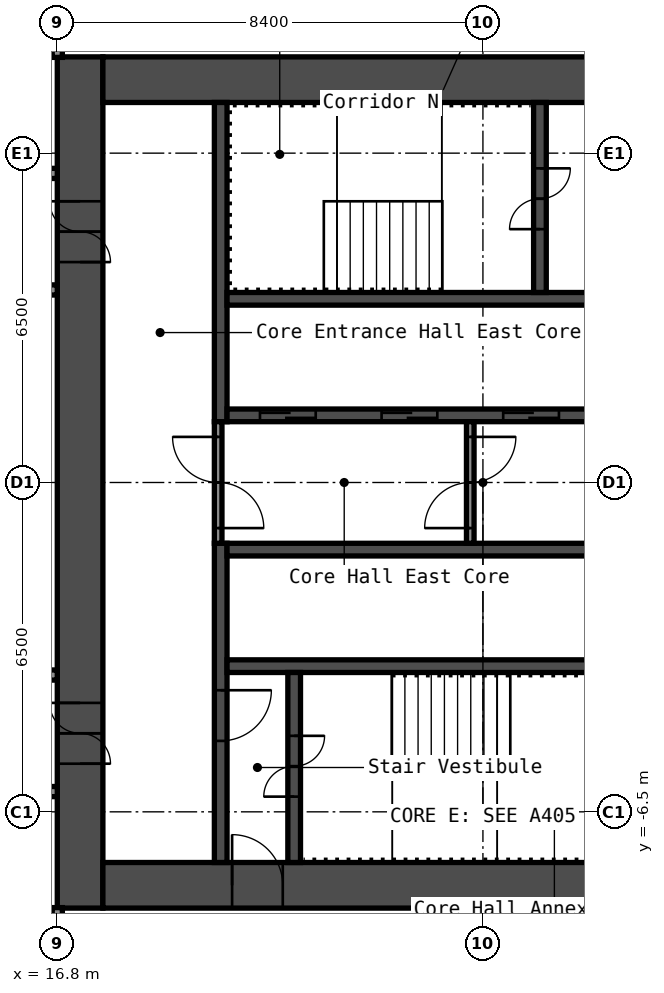
"""IFC4 building model, lengths in metres.
Left out: names, types, materials, properties, quantities, classifications, styles, units other than length and angle.
Written with IfcOpenShell. Run it as: python <this file> out.ifc"""

import sys

from ifc_helpers import new_model, si_unit, direction, frame, frame_2d, origin, place, context, subcontext, project, spatial, rectangle, extrude, element, fill, save


model = new_model("IFC4")
c1 = context("Model", 3, precision=1e-05, world=origin(), true_north=direction((0.0, 1.0)))
c2 = subcontext(c1, "Body", "Model", "MODEL_VIEW")
j1 = project(units=[si_unit("LENGTHUNIT", "METRE"), si_unit("PLANEANGLEUNIT", "RADIAN")], contexts=[c1])
p1 = place(None, origin())
s1 = spatial("IfcSite", under=j1, at=p1, CompositionType="ELEMENT")
p2 = place(p1, origin())
s2 = spatial("IfcBuilding", under=s1, at=p2, CompositionType="ELEMENT")
p3 = place(p2, frame((0.0, 0.0, 29.4)))
s3 = spatial("IfcBuildingStorey", under=s2, at=p3, CompositionType="ELEMENT", Elevation=29.4)
p4 = place(p3, frame((17.25, -8.4, 0.0), z_axis=(0.0, 0.0, 1.0), x_axis=(0.0, 1.0, 0.0)))
e1 = element("IfcWall", 1, at=p4, inside=s3, PredefinedType="SHEAR", context=c2, shape_type="SweptSolid", body=[
    extrude(rectangle(XDim=16.8, YDim=0.9, at=frame_2d((8.4, 0.0))), origin(), (0.0, 0.0, 1.0), 2.8),
])
p5 = place(p4, frame((12.75, 0.0, 0.0)))
e2 = element("IfcOpeningElement", 2, at=p5, cuts=e1, PredefinedType="OPENING", context=c2, shape_type="SweptSolid", body=[
    extrude(rectangle(XDim=1.2, YDim=2.1, at=frame_2d((0.6, 1.05))), frame((0.0, 0.46, 0.0), z_axis=(0.0, -1.0, 0.0), x_axis=(1.0, 0.0, 0.0)), (0.0, 0.0, 1.0), 0.92),
])
p6 = place(p4, frame((2.85, 0.0, 0.0)))
e3 = element("IfcOpeningElement", 3, at=p6, cuts=e1, PredefinedType="OPENING", context=c2, shape_type="SweptSolid", body=[
    extrude(rectangle(XDim=1.2, YDim=2.1, at=frame_2d((0.6, 1.05))), frame((0.0, 0.46, 0.0), z_axis=(0.0, -1.0, 0.0), x_axis=(1.0, 0.0, 0.0)), (0.0, 0.0, 1.0), 0.92),
])
p7 = place(p3, frame((17.7, 7.95, 0.0), z_axis=(0.0, 0.0, 1.0), x_axis=(1.0, 0.0, 0.0)))
e4 = element("IfcWall", 4, at=p7, inside=s3, PredefinedType="SHEAR", context=c2, shape_type="SweptSolid", body=[
    extrude(rectangle(XDim=15.0, YDim=0.9, at=frame_2d((7.5, 0.0))), origin(), (0.0, 0.0, 1.0), 2.8),
])
p8 = place(p7, frame((10.4, 0.0, 0.0)))
e5 = element("IfcOpeningElement", 5, at=p8, cuts=e4, PredefinedType="OPENING", context=c2, shape_type="SweptSolid", body=[
    extrude(rectangle(XDim=1.2, YDim=2.1, at=frame_2d((0.6, 1.05))), frame((0.0, 0.46, 0.0), z_axis=(0.0, -1.0, 0.0), x_axis=(1.0, 0.0, 0.0)), (0.0, 0.0, 1.0), 0.92),
])
p9 = place(p7, frame((13.35, 0.0, 0.0)))
e6 = element("IfcOpeningElement", 6, at=p9, cuts=e4, PredefinedType="OPENING", context=c2, shape_type="SweptSolid", body=[
    extrude(rectangle(XDim=0.9, YDim=2.1, at=frame_2d((0.45, 1.05))), frame((0.0, 0.46, 0.0), z_axis=(0.0, -1.0, 0.0), x_axis=(1.0, 0.0, 0.0)), (0.0, 0.0, 1.0), 0.92),
])
p10 = place(p3, frame((17.7, -7.95, 0.0), z_axis=(0.0, 0.0, 1.0), x_axis=(1.0, 0.0, 0.0)))
e7 = element("IfcWall", 7, at=p10, inside=s3, PredefinedType="SHEAR", context=c2, shape_type="SweptSolid", body=[
    extrude(rectangle(XDim=15.0, YDim=0.9, at=frame_2d((7.5, 0.0))), origin(), (0.0, 0.0, 1.0), 2.8),
])
p11 = place(p10, frame((2.55, 0.0, 0.0)))
e8 = element("IfcOpeningElement", 8, at=p11, cuts=e7, PredefinedType="OPENING", context=c2, shape_type="SweptSolid", body=[
    extrude(rectangle(XDim=1.0, YDim=2.1, at=frame_2d((0.5, 1.05))), frame((0.0, 0.46, 0.0), z_axis=(0.0, -1.0, 0.0), x_axis=(1.0, 0.0, 0.0)), (0.0, 0.0, 1.0), 0.92),
])
p12 = place(p3, frame((20.025, 1.2, 0.0), z_axis=(0.0, 0.0, 1.0), x_axis=(0.0, 1.0, 0.0)))
e9 = element("IfcWall", 9, at=p12, inside=s3, PredefinedType="SHEAR", context=c2, shape_type="SweptSolid", body=[
    extrude(rectangle(XDim=6.3, YDim=0.25, at=frame_2d((3.15, 0.0))), origin(), (0.0, 0.0, 1.0), 2.8),
])
p13 = place(p3, frame((20.025, -7.5, 0.0), z_axis=(0.0, 0.0, 1.0), x_axis=(0.0, 1.0, 0.0)))
e10 = element("IfcWall", 10, at=p13, inside=s3, PredefinedType="SHEAR", context=c2, shape_type="SweptSolid", body=[
    extrude(rectangle(XDim=6.3, YDim=0.25, at=frame_2d((3.15, 0.0))), origin(), (0.0, 0.0, 1.0), 2.8),
])
p14 = place(p13, frame((2.4, 0.0, 0.0)))
e11 = element("IfcOpeningElement", 11, at=p14, cuts=e10, PredefinedType="OPENING", context=c2, shape_type="SweptSolid", body=[
    extrude(rectangle(XDim=1.0, YDim=2.1, at=frame_2d((0.5, 1.05))), frame((0.0, 0.135, 0.0), z_axis=(0.0, -1.0, 0.0), x_axis=(1.0, 0.0, 0.0)), (0.0, 0.0, 1.0), 0.27),
])
p15 = place(p3, frame((20.15, 1.325, 0.0), z_axis=(0.0, 0.0, 1.0), x_axis=(1.0, 0.0, 0.0)))
e12 = element("IfcWall", 12, at=p15, inside=s3, PredefinedType="SHEAR", context=c2, shape_type="SweptSolid", body=[
    extrude(rectangle(XDim=7.5, YDim=0.25, at=frame_2d((3.75, 0.0))), origin(), (0.0, 0.0, 1.0), 2.8),
])
p16 = place(p15, frame((0.65, 0.0, 0.0)))
e13 = element("IfcOpeningElement", 13, at=p16, cuts=e12, PredefinedType="OPENING", context=c2, shape_type="SweptSolid", body=[
    extrude(rectangle(XDim=1.1, YDim=2.1, at=frame_2d((0.55, 1.05))), frame((0.0, 0.135, 0.0), z_axis=(0.0, -1.0, 0.0), x_axis=(1.0, 0.0, 0.0)), (0.0, 0.0, 1.0), 0.27),
])
p17 = place(p15, frame((3.05, 0.0, 0.0)))
e14 = element("IfcOpeningElement", 14, at=p17, cuts=e12, PredefinedType="OPENING", context=c2, shape_type="SweptSolid", body=[
    extrude(rectangle(XDim=1.1, YDim=2.1, at=frame_2d((0.55, 1.05))), frame((0.0, 0.135, 0.0), z_axis=(0.0, -1.0, 0.0), x_axis=(1.0, 0.0, 0.0)), (0.0, 0.0, 1.0), 0.27),
])
p18 = place(p15, frame((5.45, 0.0, 0.0)))
e15 = element("IfcOpeningElement", 15, at=p18, cuts=e12, PredefinedType="OPENING", context=c2, shape_type="SweptSolid", body=[
    extrude(rectangle(XDim=1.1, YDim=2.1, at=frame_2d((0.55, 1.05))), frame((0.0, 0.135, 0.0), z_axis=(0.0, -1.0, 0.0), x_axis=(1.0, 0.0, 0.0)), (0.0, 0.0, 1.0), 0.27),
])
p19 = place(p3, frame((20.15, 3.625, 0.0), z_axis=(0.0, 0.0, 1.0), x_axis=(1.0, 0.0, 0.0)))
e16 = element("IfcWall", 16, at=p19, inside=s3, PredefinedType="SHEAR", context=c2, shape_type="SweptSolid", body=[
    extrude(rectangle(XDim=7.5, YDim=0.25, at=frame_2d((3.75, 0.0))), origin(), (0.0, 0.0, 1.0), 2.8),
])
p20 = place(p3, frame((26.325, 3.75, 0.0), z_axis=(0.0, 0.0, 1.0), x_axis=(0.0, 1.0, 0.0)))
e17 = element("IfcWall", 17, at=p20, inside=s3, PredefinedType="SHEAR", context=c2, shape_type="SweptSolid", body=[
    extrude(rectangle(XDim=3.75, YDim=0.25, at=frame_2d((1.875, 0.0))), origin(), (0.0, 0.0, 1.0), 2.8),
])
p21 = place(p20, frame((1.25, 0.0, 0.0)))
e18 = element("IfcOpeningElement", 18, at=p21, cuts=e17, PredefinedType="OPENING", context=c2, shape_type="SweptSolid", body=[
    extrude(rectangle(XDim=1.2, YDim=2.1, at=frame_2d((0.6, 1.05))), frame((0.0, 0.135, 0.0), z_axis=(0.0, -1.0, 0.0), x_axis=(1.0, 0.0, 0.0)), (0.0, 0.0, 1.0), 0.27),
])
for number, where, z_axis, x_axis in (
    (19, (20.15, -1.325, 0.0), (0.0, 0.0, 1.0), (1.0, 0.0, 0.0)),
    (20, (20.15, -3.625, 0.0), (0.0, 0.0, 1.0), (1.0, 0.0, 0.0)),
):
    element("IfcWall", number, at=place(p3, frame(where, z_axis=z_axis, x_axis=x_axis)), inside=s3, PredefinedType="SHEAR", context=c2, shape_type="SweptSolid", body=[
        extrude(rectangle(XDim=7.5, YDim=0.25, at=frame_2d((3.75, 0.0))), origin(), (0.0, 0.0, 1.0), 2.8),
    ])
p22 = place(p3, frame((21.475, -7.5, 0.0), z_axis=(0.0, 0.0, 1.0), x_axis=(0.0, 1.0, 0.0)))
e21 = element("IfcWall", 21, at=p22, inside=s3, PredefinedType="SHEAR", context=c2, shape_type="SweptSolid", body=[
    extrude(rectangle(XDim=3.75, YDim=0.25, at=frame_2d((1.875, 0.0))), origin(), (0.0, 0.0, 1.0), 2.8),
])
p23 = place(p22, frame((1.3, 0.0, 0.0)))
e22 = element("IfcOpeningElement", 22, at=p23, cuts=e21, PredefinedType="OPENING", context=c2, shape_type="SweptSolid", body=[
    extrude(rectangle(XDim=1.2, YDim=2.1, at=frame_2d((0.6, 1.05))), frame((0.0, 0.135, 0.0), z_axis=(0.0, -1.0, 0.0), x_axis=(1.0, 0.0, 0.0)), (0.0, 0.0, 1.0), 0.27),
])
p24 = place(p3, frame((19.975, -1.2, 0.0), z_axis=(0.0, 0.0, 1.0), x_axis=(0.0, 1.0, 0.0)))
e23 = element("IfcWall", 23, at=p24, inside=s3, PredefinedType="PARTITIONING", context=c2, shape_type="SweptSolid", body=[
    extrude(rectangle(XDim=2.4, YDim=0.15, at=frame_2d((1.2, 0.0))), origin(), (0.0, 0.0, 1.0), 2.8),
])
p25 = place(p24, frame((0.3, 0.0, 0.0)))
e24 = element("IfcOpeningElement", 24, at=p25, cuts=e23, PredefinedType="OPENING", context=c2, shape_type="SweptSolid", body=[
    extrude(rectangle(XDim=1.8, YDim=2.1, at=frame_2d((0.9, 1.05))), frame((0.0, 0.085, 0.0), z_axis=(0.0, -1.0, 0.0), x_axis=(1.0, 0.0, 0.0)), (0.0, 0.0, 1.0), 0.17),
])
p26 = place(p3, frame((24.95, -1.2, 0.0), z_axis=(0.0, 0.0, 1.0), x_axis=(0.0, 1.0, 0.0)))
e25 = element("IfcWall", 25, at=p26, inside=s3, PredefinedType="PARTITIONING", context=c2, shape_type="SweptSolid", body=[
    extrude(rectangle(XDim=2.4, YDim=0.15, at=frame_2d((1.2, 0.0))), origin(), (0.0, 0.0, 1.0), 2.8),
])
p27 = place(p26, frame((0.3, 0.0, 0.0)))
e26 = element("IfcOpeningElement", 26, at=p27, cuts=e25, PredefinedType="OPENING", context=c2, shape_type="SweptSolid", body=[
    extrude(rectangle(XDim=1.8, YDim=2.1, at=frame_2d((0.9, 1.05))), frame((0.0, 0.085, 0.0), z_axis=(0.0, -1.0, 0.0), x_axis=(1.0, 0.0, 0.0)), (0.0, 0.0, 1.0), 0.17),
])
p28 = place(p3, frame((-16.8, -6.1, 0.0), z_axis=(0.0, 0.0, 1.0), x_axis=(1.0, 0.0, 0.0)))
e27 = element("IfcWall", 27, at=p28, inside=s3, PredefinedType="PARTITIONING", context=c2, shape_type="SweptSolid", body=[
    extrude(rectangle(XDim=33.6, YDim=0.2, at=frame_2d((16.8, 0.0))), origin(), (0.0, 0.0, 1.0), 2.8),
])
p29 = place(p28, frame((2.85, 0.0, 0.0)))
e28 = element("IfcOpeningElement", 28, at=p29, cuts=e27, PredefinedType="OPENING", context=c2, shape_type="SweptSolid", body=[
    extrude(rectangle(XDim=1.0, YDim=2.1, at=frame_2d((0.5, 1.05))), frame((0.0, 0.11, 0.0), z_axis=(0.0, -1.0, 0.0), x_axis=(1.0, 0.0, 0.0)), (0.0, 0.0, 1.0), 0.22),
])
p30 = place(p28, frame((4.55, 0.0, 0.0)))
e29 = element("IfcOpeningElement", 29, at=p30, cuts=e27, PredefinedType="OPENING", context=c2, shape_type="SweptSolid", body=[
    extrude(rectangle(XDim=1.0, YDim=2.1, at=frame_2d((0.5, 1.05))), frame((0.0, 0.11, 0.0), z_axis=(0.0, -1.0, 0.0), x_axis=(1.0, 0.0, 0.0)), (0.0, 0.0, 1.0), 0.22),
])
p31 = place(p28, frame((12.1, 0.0, 0.0)))
e30 = element("IfcOpeningElement", 30, at=p31, cuts=e27, PredefinedType="OPENING", context=c2, shape_type="SweptSolid", body=[
    extrude(rectangle(XDim=1.0, YDim=2.1, at=frame_2d((0.5, 1.05))), frame((0.0, 0.11, 0.0), z_axis=(0.0, -1.0, 0.0), x_axis=(1.0, 0.0, 0.0)), (0.0, 0.0, 1.0), 0.22),
])
p32 = place(p28, frame((19.65, 0.0, 0.0)))
e31 = element("IfcOpeningElement", 31, at=p32, cuts=e27, PredefinedType="OPENING", context=c2, shape_type="SweptSolid", body=[
    extrude(rectangle(XDim=1.0, YDim=2.1, at=frame_2d((0.5, 1.05))), frame((0.0, 0.11, 0.0), z_axis=(0.0, -1.0, 0.0), x_axis=(1.0, 0.0, 0.0)), (0.0, 0.0, 1.0), 0.22),
])
p33 = place(p28, frame((21.35, 0.0, 0.0)))
e32 = element("IfcOpeningElement", 32, at=p33, cuts=e27, PredefinedType="OPENING", context=c2, shape_type="SweptSolid", body=[
    extrude(rectangle(XDim=1.0, YDim=2.1, at=frame_2d((0.5, 1.05))), frame((0.0, 0.11, 0.0), z_axis=(0.0, -1.0, 0.0), x_axis=(1.0, 0.0, 0.0)), (0.0, 0.0, 1.0), 0.22),
])
p34 = place(p28, frame((27.2, 0.0, 0.0)))
e33 = element("IfcOpeningElement", 33, at=p34, cuts=e27, PredefinedType="OPENING", context=c2, shape_type="SweptSolid", body=[
    extrude(rectangle(XDim=1.0, YDim=2.1, at=frame_2d((0.5, 1.05))), frame((0.0, 0.11, 0.0), z_axis=(0.0, -1.0, 0.0), x_axis=(1.0, 0.0, 0.0)), (0.0, 0.0, 1.0), 0.22),
])
p35 = place(p3, frame((-16.8, -3.8, 0.0), z_axis=(0.0, 0.0, 1.0), x_axis=(1.0, 0.0, 0.0)))
e34 = element("IfcWall", 34, at=p35, inside=s3, PredefinedType="PARTITIONING", context=c2, shape_type="SweptSolid", body=[
    extrude(rectangle(XDim=33.6, YDim=0.2, at=frame_2d((16.8, 0.0))), origin(), (0.0, 0.0, 1.0), 2.8),
])
p36 = place(p35, frame((10.22, 0.0, 0.0)))
e35 = element("IfcOpeningElement", 35, at=p36, cuts=e34, PredefinedType="OPENING", context=c2, shape_type="SweptSolid", body=[
    extrude(rectangle(XDim=0.9, YDim=2.1, at=frame_2d((0.45, 1.05))), frame((0.0, 0.11, 0.0), z_axis=(0.0, -1.0, 0.0), x_axis=(1.0, 0.0, 0.0)), (0.0, 0.0, 1.0), 0.22),
])
p37 = place(p35, frame((14.42, 0.0, 0.0)))
e36 = element("IfcOpeningElement", 36, at=p37, cuts=e34, PredefinedType="OPENING", context=c2, shape_type="SweptSolid", body=[
    extrude(rectangle(XDim=0.9, YDim=2.1, at=frame_2d((0.45, 1.05))), frame((0.0, 0.11, 0.0), z_axis=(0.0, -1.0, 0.0), x_axis=(1.0, 0.0, 0.0)), (0.0, 0.0, 1.0), 0.22),
])
p38 = place(p35, frame((26.6, 0.0, 0.0)))
e37 = element("IfcOpeningElement", 37, at=p38, cuts=e34, PredefinedType="OPENING", context=c2, shape_type="SweptSolid", body=[
    extrude(rectangle(XDim=0.9, YDim=2.1, at=frame_2d((0.45, 1.05))), frame((0.0, 0.11, 0.0), z_axis=(0.0, -1.0, 0.0), x_axis=(1.0, 0.0, 0.0)), (0.0, 0.0, 1.0), 0.22),
])
p39 = place(p35, frame((30.8, 0.0, 0.0)))
e38 = element("IfcOpeningElement", 38, at=p39, cuts=e34, PredefinedType="OPENING", context=c2, shape_type="SweptSolid", body=[
    extrude(rectangle(XDim=0.9, YDim=2.1, at=frame_2d((0.45, 1.05))), frame((0.0, 0.11, 0.0), z_axis=(0.0, -1.0, 0.0), x_axis=(1.0, 0.0, 0.0)), (0.0, 0.0, 1.0), 0.22),
])
p40 = place(p3, frame((-16.8, 3.8, 0.0), z_axis=(0.0, 0.0, 1.0), x_axis=(1.0, 0.0, 0.0)))
e39 = element("IfcWall", 39, at=p40, inside=s3, PredefinedType="PARTITIONING", context=c2, shape_type="SweptSolid", body=[
    extrude(rectangle(XDim=33.6, YDim=0.2, at=frame_2d((16.8, 0.0))), origin(), (0.0, 0.0, 1.0), 2.8),
])
p41 = place(p40, frame((1.23, 0.0, 0.0)))
e40 = element("IfcOpeningElement", 40, at=p41, cuts=e39, PredefinedType="OPENING", context=c2, shape_type="SweptSolid", body=[
    extrude(rectangle(XDim=0.9, YDim=2.1, at=frame_2d((0.45, 1.05))), frame((0.0, 0.11, 0.0), z_axis=(0.0, -1.0, 0.0), x_axis=(1.0, 0.0, 0.0)), (0.0, 0.0, 1.0), 0.22),
])
p42 = place(p40, frame((5.43, 0.0, 0.0)))
e41 = element("IfcOpeningElement", 41, at=p42, cuts=e39, PredefinedType="OPENING", context=c2, shape_type="SweptSolid", body=[
    extrude(rectangle(XDim=0.9, YDim=2.1, at=frame_2d((0.45, 1.05))), frame((0.0, 0.11, 0.0), z_axis=(0.0, -1.0, 0.0), x_axis=(1.0, 0.0, 0.0)), (0.0, 0.0, 1.0), 0.22),
])
p43 = place(p40, frame((18.955, 0.0, 0.0)))
e42 = element("IfcOpeningElement", 42, at=p43, cuts=e39, PredefinedType="OPENING", context=c2, shape_type="SweptSolid", body=[
    extrude(rectangle(XDim=0.9, YDim=2.1, at=frame_2d((0.45, 1.05))), frame((0.0, 0.11, 0.0), z_axis=(0.0, -1.0, 0.0), x_axis=(1.0, 0.0, 0.0)), (0.0, 0.0, 1.0), 0.22),
])
p44 = place(p40, frame((23.155, 0.0, 0.0)))
e43 = element("IfcOpeningElement", 43, at=p44, cuts=e39, PredefinedType="OPENING", context=c2, shape_type="SweptSolid", body=[
    extrude(rectangle(XDim=0.9, YDim=2.1, at=frame_2d((0.45, 1.05))), frame((0.0, 0.11, 0.0), z_axis=(0.0, -1.0, 0.0), x_axis=(1.0, 0.0, 0.0)), (0.0, 0.0, 1.0), 0.22),
])
p45 = place(p3, frame((-16.8, 6.1, 0.0), z_axis=(0.0, 0.0, 1.0), x_axis=(1.0, 0.0, 0.0)))
e44 = element("IfcWall", 44, at=p45, inside=s3, PredefinedType="PARTITIONING", context=c2, shape_type="SweptSolid", body=[
    extrude(rectangle(XDim=33.6, YDim=0.2, at=frame_2d((16.8, 0.0))), origin(), (0.0, 0.0, 1.0), 2.8),
])
p46 = place(p45, frame((2.85, 0.0, 0.0)))
e45 = element("IfcOpeningElement", 45, at=p46, cuts=e44, PredefinedType="OPENING", context=c2, shape_type="SweptSolid", body=[
    extrude(rectangle(XDim=1.0, YDim=2.1, at=frame_2d((0.5, 1.05))), frame((0.0, 0.11, 0.0), z_axis=(0.0, -1.0, 0.0), x_axis=(1.0, 0.0, 0.0)), (0.0, 0.0, 1.0), 0.22),
])
p47 = place(p45, frame((4.55, 0.0, 0.0)))
e46 = element("IfcOpeningElement", 46, at=p47, cuts=e44, PredefinedType="OPENING", context=c2, shape_type="SweptSolid", body=[
    extrude(rectangle(XDim=1.0, YDim=2.1, at=frame_2d((0.5, 1.05))), frame((0.0, 0.11, 0.0), z_axis=(0.0, -1.0, 0.0), x_axis=(1.0, 0.0, 0.0)), (0.0, 0.0, 1.0), 0.22),
])
p48 = place(p45, frame((13.8, 0.0, 0.0)))
e47 = element("IfcOpeningElement", 47, at=p48, cuts=e44, PredefinedType="OPENING", context=c2, shape_type="SweptSolid", body=[
    extrude(rectangle(XDim=1.0, YDim=2.1, at=frame_2d((0.5, 1.05))), frame((0.0, 0.11, 0.0), z_axis=(0.0, -1.0, 0.0), x_axis=(1.0, 0.0, 0.0)), (0.0, 0.0, 1.0), 0.22),
])
p49 = place(p45, frame((19.65, 0.0, 0.0)))
e48 = element("IfcOpeningElement", 48, at=p49, cuts=e44, PredefinedType="OPENING", context=c2, shape_type="SweptSolid", body=[
    extrude(rectangle(XDim=1.0, YDim=2.1, at=frame_2d((0.5, 1.05))), frame((0.0, 0.11, 0.0), z_axis=(0.0, -1.0, 0.0), x_axis=(1.0, 0.0, 0.0)), (0.0, 0.0, 1.0), 0.22),
])
p50 = place(p45, frame((21.35, 0.0, 0.0)))
e49 = element("IfcOpeningElement", 49, at=p50, cuts=e44, PredefinedType="OPENING", context=c2, shape_type="SweptSolid", body=[
    extrude(rectangle(XDim=1.0, YDim=2.1, at=frame_2d((0.5, 1.05))), frame((0.0, 0.11, 0.0), z_axis=(0.0, -1.0, 0.0), x_axis=(1.0, 0.0, 0.0)), (0.0, 0.0, 1.0), 0.22),
])
p51 = place(p45, frame((27.2, 0.0, 0.0)))
e50 = element("IfcOpeningElement", 50, at=p51, cuts=e44, PredefinedType="OPENING", context=c2, shape_type="SweptSolid", body=[
    extrude(rectangle(XDim=1.0, YDim=2.1, at=frame_2d((0.5, 1.05))), frame((0.0, 0.11, 0.0), z_axis=(0.0, -1.0, 0.0), x_axis=(1.0, 0.0, 0.0)), (0.0, 0.0, 1.0), 0.22),
])
for number, where, z_axis, x_axis in (
    (51, (16.8, -20.3, 0.0), (0.0, 0.0, 1.0), (0.0, 1.0, 0.0)),
    (52, (16.8, 8.39, 0.0), (0.0, 0.0, 1.0), (0.0, 1.0, 0.0)),
):
    element("IfcWall", number, at=place(p3, frame(where, z_axis=z_axis, x_axis=x_axis)), inside=s3, PredefinedType="PARTITIONING", context=c2, shape_type="SweptSolid", body=[
        extrude(rectangle(XDim=11.91, YDim=0.2, at=frame_2d((5.955, 0.0))), origin(), (0.0, 0.0, 1.0), 2.8),
    ])
p52 = place(p5, origin())
e53 = element("IfcDoor", 53, at=p52, inside=s3, OperationType="DOUBLE_DOOR_SINGLE_SWING", PredefinedType="DOOR", context=c2, shape_type="SweptSolid", body=[
    extrude(rectangle(XDim=1.2, YDim=2.1, at=frame_2d((0.6, 1.05))), frame((0.0, 0.025, 0.0), z_axis=(0.0, -1.0, 0.0), x_axis=(1.0, 0.0, 0.0)), (0.0, 0.0, 1.0), 0.05),
])
fill(e2, e53)
p53 = place(p6, origin())
e54 = element("IfcDoor", 54, at=p53, inside=s3, OperationType="DOUBLE_DOOR_SINGLE_SWING", PredefinedType="DOOR", context=c2, shape_type="SweptSolid", body=[
    extrude(rectangle(XDim=1.2, YDim=2.1, at=frame_2d((0.6, 1.05))), frame((0.0, 0.025, 0.0), z_axis=(0.0, -1.0, 0.0), x_axis=(1.0, 0.0, 0.0)), (0.0, 0.0, 1.0), 0.05),
])
fill(e3, e54)
p54 = place(p11, origin())
e55 = element("IfcDoor", 55, at=p54, inside=s3, OperationType="SINGLE_SWING_RIGHT", PredefinedType="DOOR", context=c2, shape_type="SweptSolid", body=[
    extrude(rectangle(XDim=1.0, YDim=2.1, at=frame_2d((0.5, 1.05))), frame((0.0, 0.025, 0.0), z_axis=(0.0, -1.0, 0.0), x_axis=(1.0, 0.0, 0.0)), (0.0, 0.0, 1.0), 0.05),
])
fill(e8, e55)
p55 = place(p21, origin())
e56 = element("IfcDoor", 56, at=p55, inside=s3, OperationType="DOUBLE_DOOR_SINGLE_SWING", PredefinedType="DOOR", context=c2, shape_type="SweptSolid", body=[
    extrude(rectangle(XDim=1.2, YDim=2.1, at=frame_2d((0.6, 1.05))), frame((0.0, 0.025, 0.0), z_axis=(0.0, -1.0, 0.0), x_axis=(1.0, 0.0, 0.0)), (0.0, 0.0, 1.0), 0.05),
])
fill(e18, e56)
p56 = place(p23, origin())
e57 = element("IfcDoor", 57, at=p56, inside=s3, OperationType="DOUBLE_DOOR_SINGLE_SWING", PredefinedType="DOOR", context=c2, shape_type="SweptSolid", body=[
    extrude(rectangle(XDim=1.2, YDim=2.1, at=frame_2d((0.6, 1.05))), frame((0.0, 0.025, 0.0), z_axis=(0.0, -1.0, 0.0), x_axis=(1.0, 0.0, 0.0)), (0.0, 0.0, 1.0), 0.05),
])
fill(e22, e57)
p57 = place(p14, origin())
e58 = element("IfcDoor", 58, at=p57, inside=s3, OperationType="SINGLE_SWING_RIGHT", PredefinedType="DOOR", context=c2, shape_type="SweptSolid", body=[
    extrude(rectangle(XDim=1.0, YDim=2.1, at=frame_2d((0.5, 1.05))), frame((0.0, 0.025, 0.0), z_axis=(0.0, -1.0, 0.0), x_axis=(1.0, 0.0, 0.0)), (0.0, 0.0, 1.0), 0.05),
])
fill(e11, e58)
p58 = place(p25, origin())
e59 = element("IfcDoor", 59, at=p58, inside=s3, OperationType="DOUBLE_DOOR_SINGLE_SWING", PredefinedType="DOOR", context=c2, shape_type="SweptSolid", body=[
    extrude(rectangle(XDim=1.8, YDim=2.1, at=frame_2d((0.9, 1.05))), frame((0.0, 0.025, 0.0), z_axis=(0.0, -1.0, 0.0), x_axis=(1.0, 0.0, 0.0)), (0.0, 0.0, 1.0), 0.05),
])
fill(e24, e59)
p59 = place(p27, origin())
e60 = element("IfcDoor", 60, at=p59, inside=s3, OperationType="DOUBLE_DOOR_SINGLE_SWING", PredefinedType="DOOR", context=c2, shape_type="SweptSolid", body=[
    extrude(rectangle(XDim=1.8, YDim=2.1, at=frame_2d((0.9, 1.05))), frame((0.0, 0.025, 0.0), z_axis=(0.0, -1.0, 0.0), x_axis=(1.0, 0.0, 0.0)), (0.0, 0.0, 1.0), 0.05),
])
fill(e26, e60)
p60 = place(p16, origin())
e61 = element("IfcDoor", 61, at=p60, inside=s3, OperationType="DOUBLE_DOOR_SLIDING", PredefinedType="DOOR", context=c2, shape_type="SweptSolid", body=[
    extrude(rectangle(XDim=1.1, YDim=2.1, at=frame_2d((0.55, 1.05))), frame((0.0, 0.025, 0.0), z_axis=(0.0, -1.0, 0.0), x_axis=(1.0, 0.0, 0.0)), (0.0, 0.0, 1.0), 0.05),
])
fill(e13, e61)
p61 = place(p17, origin())
e62 = element("IfcDoor", 62, at=p61, inside=s3, OperationType="DOUBLE_DOOR_SLIDING", PredefinedType="DOOR", context=c2, shape_type="SweptSolid", body=[
    extrude(rectangle(XDim=1.1, YDim=2.1, at=frame_2d((0.55, 1.05))), frame((0.0, 0.025, 0.0), z_axis=(0.0, -1.0, 0.0), x_axis=(1.0, 0.0, 0.0)), (0.0, 0.0, 1.0), 0.05),
])
fill(e14, e62)
p62 = place(p18, origin())
e63 = element("IfcDoor", 63, at=p62, inside=s3, OperationType="DOUBLE_DOOR_SLIDING", PredefinedType="DOOR", context=c2, shape_type="SweptSolid", body=[
    extrude(rectangle(XDim=1.1, YDim=2.1, at=frame_2d((0.55, 1.05))), frame((0.0, 0.025, 0.0), z_axis=(0.0, -1.0, 0.0), x_axis=(1.0, 0.0, 0.0)), (0.0, 0.0, 1.0), 0.05),
])
fill(e15, e63)
save(model, sys.argv[1])
